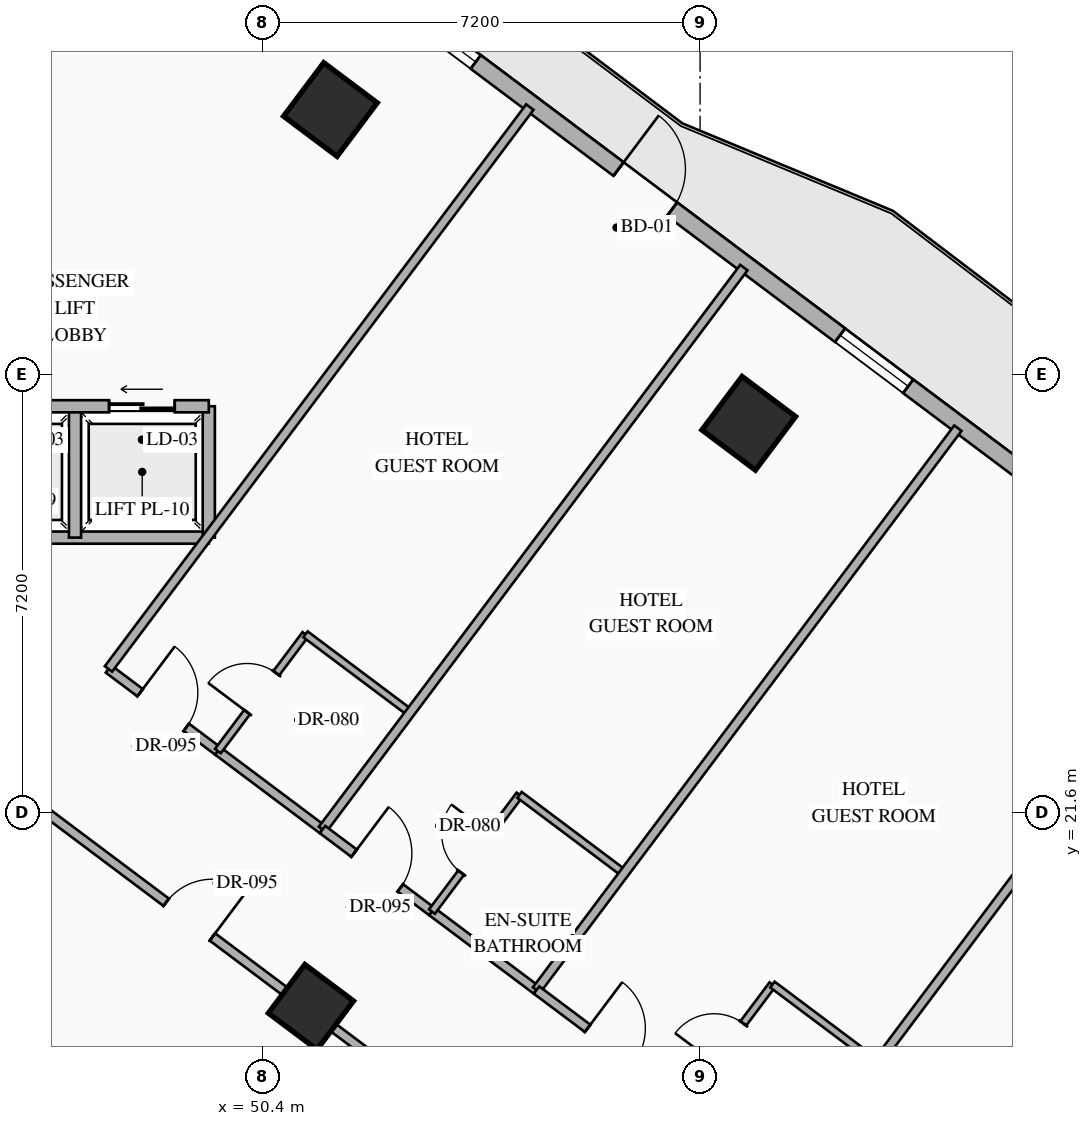
"""IFC4 building model, lengths in metres.
Left out: names, types, materials, properties, quantities, classifications, styles, units other than length and angle.
Written with IfcOpenShell. Run it as: python <this file> out.ifc"""

import sys

from ifc_helpers import new_model, si_unit, direction, frame, frame_2d, origin, origin_2d, place, context, subcontext, project, spatial, rectangle, hollow_rectangle, extrude, element, fill, save


model = new_model("IFC4")
c1 = context("Model", 3, precision=1e-05, world=origin(), true_north=direction((0.0, 1.0)))
c2 = subcontext(c1, "Body", "Model", "MODEL_VIEW")
j1 = project(units=[si_unit("LENGTHUNIT", "METRE"), si_unit("PLANEANGLEUNIT", "RADIAN")], contexts=[c1])
p1 = place(None, origin())
s1 = spatial("IfcSite", under=j1, at=p1, CompositionType="ELEMENT")
p2 = place(p1, origin())
s2 = spatial("IfcBuilding", under=s1, at=p2, CompositionType="ELEMENT")
p3 = place(p2, frame((0.0, 0.0, 46.65)))
s3 = spatial("IfcBuildingStorey", under=s2, at=p3, CompositionType="ELEMENT", Elevation=46.65)
for number, where, z_axis, x_axis in (
    (1, (51.52, 33.16, 0.0), (0.0, 0.0, 1.0), (0.8, -0.6, 0.0)),
    (2, (58.4, 28.0, 0.0), (0.0, 0.0, 1.0), (0.8, -0.6, 0.0)),
):
    element("IfcColumn", number, at=place(p3, frame(where, z_axis=z_axis, x_axis=x_axis)), inside=s3, PredefinedType="COLUMN", context=c2, shape_type="SweptSolid", body=[
        extrude(hollow_rectangle(XDim=1.1, YDim=1.1, WallThickness=0.04, at=origin_2d()), origin(), (0.0, 0.0, 1.0), 3.35),
    ])
p4 = place(p3, frame((51.2, 18.4, 0.0), z_axis=(0.0, 0.0, 1.0), x_axis=(0.799999996291, -0.600000004945, 0.0)))
e3 = element("IfcColumn", 3, at=p4, inside=s3, PredefinedType="COLUMN", context=c2, shape_type="SweptSolid", body=[
    extrude(hollow_rectangle(XDim=1.0, YDim=1.0, WallThickness=0.038, at=origin_2d()), origin(), (0.0, 0.0, 1.0), 3.35),
])
p5 = place(p3, frame((44.86, 40.73, 0.0), z_axis=(0.0, 0.0, 1.0), x_axis=(0.800006902154, -0.599990797017, 0.0)))
e4 = element("IfcWall", 4, at=p5, inside=s3, PredefinedType="STANDARD", context=c2, shape_type="SweptSolid", body=[
    extrude(rectangle(XDim=29.712, YDim=0.28, at=frame_2d((14.856, 0.0))), origin(), (0.0, 0.0, 1.0), 3.13),
])
p6 = place(p5, frame((14.249, 0.0, 0.0)))
e5 = element("IfcOpeningElement", 5, at=p6, cuts=e4, PredefinedType="OPENING", context=c2, shape_type="SweptSolid", body=[
    extrude(rectangle(XDim=1.1, YDim=2.2, at=frame_2d((0.55, 1.1))), frame((0.0, 0.15, 0.0), z_axis=(0.0, -1.0, 0.0), x_axis=(1.0, 0.0, 0.0)), (0.0, 0.0, 1.0), 0.3),
])
p7 = place(p5, frame((1.612, 0.0, 0.85)))
e6 = element("IfcOpeningElement", 6, at=p7, cuts=e4, PredefinedType="OPENING", context=c2, shape_type="SweptSolid", body=[
    extrude(rectangle(XDim=1.4, YDim=1.8, at=frame_2d((0.7, 0.9))), frame((0.0, 0.15, 0.0), z_axis=(0.0, -1.0, 0.0), x_axis=(1.0, 0.0, 0.0)), (0.0, 0.0, 1.0), 0.3),
])
p8 = place(p5, frame((5.667, 0.0, 0.85)))
e7 = element("IfcOpeningElement", 7, at=p8, cuts=e4, PredefinedType="OPENING", context=c2, shape_type="SweptSolid", body=[
    extrude(rectangle(XDim=1.4, YDim=1.8, at=frame_2d((0.7, 0.9))), frame((0.0, 0.15, 0.0), z_axis=(0.0, -1.0, 0.0), x_axis=(1.0, 0.0, 0.0)), (0.0, 0.0, 1.0), 0.3),
])
p9 = place(p5, frame((9.912, 0.0, 0.85)))
e8 = element("IfcOpeningElement", 8, at=p9, cuts=e4, PredefinedType="OPENING", context=c2, shape_type="SweptSolid", body=[
    extrude(rectangle(XDim=1.4, YDim=1.8, at=frame_2d((0.7, 0.9))), frame((0.0, 0.15, 0.0), z_axis=(0.0, -1.0, 0.0), x_axis=(1.0, 0.0, 0.0)), (0.0, 0.0, 1.0), 0.3),
])
p10 = place(p5, frame((18.803, 0.0, 0.85)))
e9 = element("IfcOpeningElement", 9, at=p10, cuts=e4, PredefinedType="OPENING", context=c2, shape_type="SweptSolid", body=[
    extrude(rectangle(XDim=1.4, YDim=1.8, at=frame_2d((0.7, 0.9))), frame((0.0, 0.15, 0.0), z_axis=(0.0, -1.0, 0.0), x_axis=(1.0, 0.0, 0.0)), (0.0, 0.0, 1.0), 0.3),
])
p11 = place(p5, frame((22.645, 0.0, 0.85)))
e10 = element("IfcOpeningElement", 10, at=p11, cuts=e4, PredefinedType="OPENING", context=c2, shape_type="SweptSolid", body=[
    extrude(rectangle(XDim=1.4, YDim=1.8, at=frame_2d((0.7, 0.9))), frame((0.0, 0.15, 0.0), z_axis=(0.0, -1.0, 0.0), x_axis=(1.0, 0.0, 0.0)), (0.0, 0.0, 1.0), 0.3),
])
p12 = place(p5, frame((27.668, 0.0, 0.85)))
e11 = element("IfcOpeningElement", 11, at=p12, cuts=e4, PredefinedType="OPENING", context=c2, shape_type="SweptSolid", body=[
    extrude(rectangle(XDim=1.4, YDim=1.8, at=frame_2d((0.7, 0.9))), frame((0.0, 0.15, 0.0), z_axis=(0.0, -1.0, 0.0), x_axis=(1.0, 0.0, 0.0)), (0.0, 0.0, 1.0), 0.3),
])
p13 = place(p3, frame((53.318, 2.487, 0.0), z_axis=(0.0, 0.0, 1.0), x_axis=(-0.800004174678, 0.599994433723, 0.0)))
e12 = element("IfcWall", 12, at=p13, inside=s3, PredefinedType="STANDARD", context=c2, shape_type="SweptSolid", body=[
    extrude(rectangle(XDim=35.089, YDim=0.28, at=frame_2d((17.544, 0.0))), origin(), (0.0, 0.0, 1.0), 3.13),
])
p14 = place(p13, frame((1.931, 0.0, 0.85)))
e13 = element("IfcOpeningElement", 13, at=p14, cuts=e12, PredefinedType="OPENING", context=c2, shape_type="SweptSolid", body=[
    extrude(rectangle(XDim=1.4, YDim=1.8, at=frame_2d((0.7, 0.9))), frame((0.0, 0.15, 0.0), z_axis=(0.0, -1.0, 0.0), x_axis=(1.0, 0.0, 0.0)), (0.0, 0.0, 1.0), 0.3),
])
p15 = place(p13, frame((6.819, 0.0, 0.85)))
e14 = element("IfcOpeningElement", 14, at=p15, cuts=e12, PredefinedType="OPENING", context=c2, shape_type="SweptSolid", body=[
    extrude(rectangle(XDim=1.4, YDim=1.8, at=frame_2d((0.7, 0.9))), frame((0.0, 0.15, 0.0), z_axis=(0.0, -1.0, 0.0), x_axis=(1.0, 0.0, 0.0)), (0.0, 0.0, 1.0), 0.3),
])
p16 = place(p13, frame((11.832, 0.0, 0.85)))
e15 = element("IfcOpeningElement", 15, at=p16, cuts=e12, PredefinedType="OPENING", context=c2, shape_type="SweptSolid", body=[
    extrude(rectangle(XDim=1.4, YDim=1.8, at=frame_2d((0.7, 0.9))), frame((0.0, 0.15, 0.0), z_axis=(0.0, -1.0, 0.0), x_axis=(1.0, 0.0, 0.0)), (0.0, 0.0, 1.0), 0.3),
])
p17 = place(p13, frame((17.647, 0.0, 0.85)))
e16 = element("IfcOpeningElement", 16, at=p17, cuts=e12, PredefinedType="OPENING", context=c2, shape_type="SweptSolid", body=[
    extrude(rectangle(XDim=1.4, YDim=1.8, at=frame_2d((0.7, 0.9))), frame((0.0, 0.15, 0.0), z_axis=(0.0, -1.0, 0.0), x_axis=(1.0, 0.0, 0.0)), (0.0, 0.0, 1.0), 0.3),
])
p18 = place(p13, frame((21.857, 0.0, 0.85)))
e17 = element("IfcOpeningElement", 17, at=p18, cuts=e12, PredefinedType="OPENING", context=c2, shape_type="SweptSolid", body=[
    extrude(rectangle(XDim=1.4, YDim=1.8, at=frame_2d((0.7, 0.9))), frame((0.0, 0.15, 0.0), z_axis=(0.0, -1.0, 0.0), x_axis=(1.0, 0.0, 0.0)), (0.0, 0.0, 1.0), 0.3),
])
p19 = place(p13, frame((26.87, 0.0, 0.85)))
e18 = element("IfcOpeningElement", 18, at=p19, cuts=e12, PredefinedType="OPENING", context=c2, shape_type="SweptSolid", body=[
    extrude(rectangle(XDim=1.4, YDim=1.8, at=frame_2d((0.7, 0.9))), frame((0.0, 0.15, 0.0), z_axis=(0.0, -1.0, 0.0), x_axis=(1.0, 0.0, 0.0)), (0.0, 0.0, 1.0), 0.3),
])
p20 = place(p13, frame((31.757, 0.0, 0.85)))
e19 = element("IfcOpeningElement", 19, at=p20, cuts=e12, PredefinedType="OPENING", context=c2, shape_type="SweptSolid", body=[
    extrude(rectangle(XDim=1.4, YDim=1.8, at=frame_2d((0.7, 0.9))), frame((0.0, 0.15, 0.0), z_axis=(0.0, -1.0, 0.0), x_axis=(1.0, 0.0, 0.0)), (0.0, 0.0, 1.0), 0.3),
])
p21 = place(p3, frame((45.12, 26.12, 0.0), z_axis=(0.0, 0.0, 1.0), x_axis=(1.0, 0.0, 0.0)))
e20 = element("IfcWall", 20, at=p21, inside=s3, PredefinedType="STANDARD", context=c2, shape_type="SweptSolid", body=[
    extrude(rectangle(XDim=4.4, YDim=0.2, at=frame_2d((2.2, 0.0))), origin(), (0.0, 0.0, 1.0), 3.13),
])
for number, where, z_axis, x_axis in (
    (21, (49.52, 26.12, 0.0), (0.0, 0.0, 1.0), (0.0, 1.0, 0.0)),
    (22, (47.32, 26.12, 0.0), (0.0, 0.0, 1.0), (0.0, 1.0, 0.0)),
):
    element("IfcWall", number, at=place(p3, frame(where, z_axis=z_axis, x_axis=x_axis)), inside=s3, PredefinedType="STANDARD", context=c2, shape_type="SweptSolid", body=[
        extrude(rectangle(XDim=2.16, YDim=0.2, at=frame_2d((1.08, 0.0))), origin(), (0.0, 0.0, 1.0), 3.13),
    ])
p22 = place(p3, frame((45.12, 28.28, 0.0), z_axis=(0.0, 0.0, 1.0), x_axis=(1.0, 0.0, 0.0)))
e23 = element("IfcWall", 23, at=p22, inside=s3, PredefinedType="STANDARD", context=c2, shape_type="SweptSolid", body=[
    extrude(rectangle(XDim=4.4, YDim=0.2, at=frame_2d((2.2, 0.0))), origin(), (0.0, 0.0, 1.0), 3.13),
])
p23 = place(p22, frame((0.56, 0.0, 0.0)))
e24 = element("IfcOpeningElement", 24, at=p23, cuts=e23, PredefinedType="OPENING", context=c2, shape_type="SweptSolid", body=[
    extrude(rectangle(XDim=1.08, YDim=2.15, at=frame_2d((0.54, 1.075))), frame((0.0, 0.11, 0.0), z_axis=(0.0, -1.0, 0.0), x_axis=(1.0, 0.0, 0.0)), (0.0, 0.0, 1.0), 0.22),
])
p24 = place(p22, frame((2.76, 0.0, 0.0)))
e25 = element("IfcOpeningElement", 25, at=p24, cuts=e23, PredefinedType="OPENING", context=c2, shape_type="SweptSolid", body=[
    extrude(rectangle(XDim=1.08, YDim=2.15, at=frame_2d((0.54, 1.075))), frame((0.0, 0.11, 0.0), z_axis=(0.0, -1.0, 0.0), x_axis=(1.0, 0.0, 0.0)), (0.0, 0.0, 1.0), 0.22),
])
p25 = place(p3, frame((47.87, 23.96, 0.0), z_axis=(0.0, 0.0, 1.0), x_axis=(0.8, -0.6, 0.0)))
e26 = element("IfcWall", 26, at=p25, inside=s3, PredefinedType="PARTITIONING", context=c2, shape_type="SweptSolid", body=[
    extrude(rectangle(XDim=2.25, YDim=0.15, at=frame_2d((1.125, 0.0))), origin(), (0.0, 0.0, 1.0), 2.775),
])
p26 = place(p25, frame((0.65, 0.0, 0.0)))
e27 = element("IfcOpeningElement", 27, at=p26, cuts=e26, PredefinedType="OPENING", context=c2, shape_type="SweptSolid", body=[
    extrude(rectangle(XDim=0.95, YDim=2.15, at=frame_2d((0.475, 1.075))), frame((0.0, 0.085, 0.0), z_axis=(0.0, -1.0, 0.0), x_axis=(1.0, 0.0, 0.0)), (0.0, 0.0, 1.0), 0.17),
])
p27 = place(p3, frame((49.67, 22.61, 0.0), z_axis=(0.0, 0.0, 1.0), x_axis=(0.79998637334, -0.60001816845, 0.0)))
e28 = element("IfcWall", 28, at=p27, inside=s3, PredefinedType="PARTITIONING", context=c2, shape_type="SweptSolid", body=[
    extrude(rectangle(XDim=2.15, YDim=0.15, at=frame_2d((1.075, 0.0))), origin(), (0.0, 0.0, 1.0), 2.775),
])
p28 = place(p3, frame((49.67, 22.61, 0.0), z_axis=(0.0, 0.0, 1.0), x_axis=(0.600065100855, 0.79995117022, 0.0)))
e29 = element("IfcWall", 29, at=p28, inside=s3, PredefinedType="PARTITIONING", context=c2, shape_type="SweptSolid", body=[
    extrude(rectangle(XDim=2.4, YDim=0.12, at=frame_2d((1.2, 0.0))), origin(), (0.0, 0.0, 1.0), 3.13),
])
p29 = place(p28, frame((0.8, 0.0, 0.0)))
e30 = element("IfcOpeningElement", 30, at=p29, cuts=e29, PredefinedType="OPENING", context=c2, shape_type="SweptSolid", body=[
    extrude(rectangle(XDim=0.8, YDim=2.06, at=frame_2d((0.4, 1.03))), frame((0.0, 0.07, 0.0), z_axis=(0.0, -1.0, 0.0), x_axis=(1.0, 0.0, 0.0)), (0.0, 0.0, 1.0), 0.14),
])
p30 = place(p3, frame((51.11, 24.53, 0.0), z_axis=(0.0, 0.0, 1.0), x_axis=(0.79998637334, -0.60001816845, 0.0)))
e31 = element("IfcWall", 31, at=p30, inside=s3, PredefinedType="PARTITIONING", context=c2, shape_type="SweptSolid", body=[
    extrude(rectangle(XDim=2.15, YDim=0.12, at=frame_2d((1.075, 0.0))), origin(), (0.0, 0.0, 1.0), 3.13),
])
for number, where, z_axis, x_axis in (
    (32, (47.87, 23.96, 0.0), (0.0, 0.0, 1.0), (0.6, 0.8, 0.0)),
    (33, (51.39, 21.32, 0.0), (0.0, 0.0, 1.0), (0.6, 0.8, 0.0)),
):
    element("IfcWall", number, at=place(p3, frame(where, z_axis=z_axis, x_axis=x_axis)), inside=s3, PredefinedType="PARTITIONING", context=c2, shape_type="SweptSolid", body=[
        extrude(rectangle(XDim=11.55, YDim=0.15, at=frame_2d((5.775, 0.0))), origin(), (0.0, 0.0, 1.0), 3.13),
    ])
p31 = place(p3, frame((51.39, 21.32, 0.0), z_axis=(0.0, 0.0, 1.0), x_axis=(0.799986979543, -0.600017360216, 0.0)))
e34 = element("IfcWall", 34, at=p31, inside=s3, PredefinedType="PARTITIONING", context=c2, shape_type="SweptSolid", body=[
    extrude(rectangle(XDim=2.25, YDim=0.15, at=frame_2d((1.125, 0.0))), origin(), (0.0, 0.0, 1.0), 2.775),
])
p32 = place(p31, frame((0.65, 0.0, 0.0)))
e35 = element("IfcOpeningElement", 35, at=p32, cuts=e34, PredefinedType="OPENING", context=c2, shape_type="SweptSolid", body=[
    extrude(rectangle(XDim=0.95, YDim=2.15, at=frame_2d((0.475, 1.075))), frame((0.0, 0.085, 0.0), z_axis=(0.0, -1.0, 0.0), x_axis=(1.0, 0.0, 0.0)), (0.0, 0.0, 1.0), 0.17),
])
p33 = place(p3, frame((53.19, 19.97, 0.0), z_axis=(0.0, 0.0, 1.0), x_axis=(0.79998637334, -0.60001816845, 0.0)))
e36 = element("IfcWall", 36, at=p33, inside=s3, PredefinedType="PARTITIONING", context=c2, shape_type="SweptSolid", body=[
    extrude(rectangle(XDim=2.15, YDim=0.15, at=frame_2d((1.075, 0.0))), origin(), (0.0, 0.0, 1.0), 2.775),
])
p34 = place(p3, frame((53.19, 19.97, 0.0), z_axis=(0.0, 0.0, 1.0), x_axis=(0.6, 0.8, 0.0)))
e37 = element("IfcWall", 37, at=p34, inside=s3, PredefinedType="PARTITIONING", context=c2, shape_type="SweptSolid", body=[
    extrude(rectangle(XDim=2.4, YDim=0.12, at=frame_2d((1.2, 0.0))), origin(), (0.0, 0.0, 1.0), 3.13),
])
p35 = place(p34, frame((0.8, 0.0, 0.0)))
e38 = element("IfcOpeningElement", 38, at=p35, cuts=e37, PredefinedType="OPENING", context=c2, shape_type="SweptSolid", body=[
    extrude(rectangle(XDim=0.8, YDim=2.06, at=frame_2d((0.4, 1.03))), frame((0.0, 0.07, 0.0), z_axis=(0.0, -1.0, 0.0), x_axis=(1.0, 0.0, 0.0)), (0.0, 0.0, 1.0), 0.14),
])
p36 = place(p3, frame((54.63, 21.89, 0.0), z_axis=(0.0, 0.0, 1.0), x_axis=(0.800081749437, -0.599890985279, 0.0)))
e39 = element("IfcWall", 39, at=p36, inside=s3, PredefinedType="PARTITIONING", context=c2, shape_type="SweptSolid", body=[
    extrude(rectangle(XDim=2.15, YDim=0.12, at=frame_2d((1.075, 0.0))), origin(), (0.0, 0.0, 1.0), 3.13),
])
p37 = place(p3, frame((54.91, 18.68, 0.0), z_axis=(0.0, 0.0, 1.0), x_axis=(0.60001014597, 0.799992390422, 0.0)))
e40 = element("IfcWall", 40, at=p37, inside=s3, PredefinedType="PARTITIONING", context=c2, shape_type="SweptSolid", body=[
    extrude(rectangle(XDim=11.55, YDim=0.15, at=frame_2d((5.775, 0.0))), origin(), (0.0, 0.0, 1.0), 3.13),
])
p38 = place(p3, frame((54.91, 18.68, 0.0), z_axis=(0.0, 0.0, 1.0), x_axis=(0.800048024332, -0.599935962218, 0.0)))
e41 = element("IfcWall", 41, at=p38, inside=s3, PredefinedType="PARTITIONING", context=c2, shape_type="SweptSolid", body=[
    extrude(rectangle(XDim=3.05, YDim=0.15, at=frame_2d((1.525, 0.0))), origin(), (0.0, 0.0, 1.0), 2.775),
])
p39 = place(p38, frame((1.05, 0.0, 0.0)))
e42 = element("IfcOpeningElement", 42, at=p39, cuts=e41, PredefinedType="OPENING", context=c2, shape_type="SweptSolid", body=[
    extrude(rectangle(XDim=0.95, YDim=2.15, at=frame_2d((0.475, 1.075))), frame((0.0, 0.085, 0.0), z_axis=(0.0, -1.0, 0.0), x_axis=(1.0, 0.0, 0.0)), (0.0, 0.0, 1.0), 0.17),
])
p40 = place(p3, frame((57.35, 16.85, 0.0), z_axis=(0.0, 0.0, 1.0), x_axis=(0.6, 0.8, 0.0)))
e43 = element("IfcWall", 43, at=p40, inside=s3, PredefinedType="PARTITIONING", context=c2, shape_type="SweptSolid", body=[
    extrude(rectangle(XDim=2.4, YDim=0.12, at=frame_2d((1.2, 0.0))), origin(), (0.0, 0.0, 1.0), 3.13),
])
p41 = place(p40, frame((0.8, 0.0, 0.0)))
e44 = element("IfcOpeningElement", 44, at=p41, cuts=e43, PredefinedType="OPENING", context=c2, shape_type="SweptSolid", body=[
    extrude(rectangle(XDim=0.8, YDim=2.06, at=frame_2d((0.4, 1.03))), frame((0.0, 0.07, 0.0), z_axis=(0.0, -1.0, 0.0), x_axis=(1.0, 0.0, 0.0)), (0.0, 0.0, 1.0), 0.14),
])
p42 = place(p3, frame((58.79, 18.77, 0.0), z_axis=(0.0, 0.0, 1.0), x_axis=(0.79998637334, -0.60001816845, 0.0)))
e45 = element("IfcWall", 45, at=p42, inside=s3, PredefinedType="PARTITIONING", context=c2, shape_type="SweptSolid", body=[
    extrude(rectangle(XDim=2.15, YDim=0.12, at=frame_2d((1.075, 0.0))), origin(), (0.0, 0.0, 1.0), 3.13),
])
p43 = place(p3, frame((59.07, 15.56, 0.0), z_axis=(0.0, 0.0, 1.0), x_axis=(0.599996617946, 0.80000253653, 0.0)))
e46 = element("IfcWall", 46, at=p43, inside=s3, PredefinedType="PARTITIONING", context=c2, shape_type="SweptSolid", body=[
    extrude(rectangle(XDim=11.55, YDim=0.15, at=frame_2d((5.775, 0.0))), origin(), (0.0, 0.0, 1.0), 3.13),
])
p44 = place(p3, frame((46.37, 21.96, 0.0), z_axis=(0.0, 0.0, 1.0), x_axis=(0.799997249048, -0.600003667918, 0.0)))
e47 = element("IfcWall", 47, at=p44, inside=s3, PredefinedType="PARTITIONING", context=c2, shape_type="SweptSolid", body=[
    extrude(rectangle(XDim=10.65, YDim=0.15, at=frame_2d((5.325, 0.0))), origin(), (0.0, 0.0, 1.0), 2.425),
])
p45 = place(p44, frame((3.062, 0.0, 0.0)))
e48 = element("IfcOpeningElement", 48, at=p45, cuts=e47, PredefinedType="OPENING", context=c2, shape_type="SweptSolid", body=[
    extrude(rectangle(XDim=0.95, YDim=2.15, at=frame_2d((0.475, 1.075))), frame((0.0, 0.085, 0.0), z_axis=(0.0, -1.0, 0.0), x_axis=(1.0, 0.0, 0.0)), (0.0, 0.0, 1.0), 0.17),
])
p46 = place(p6, origin())
e49 = element("IfcDoor", 49, at=p46, inside=s3, OperationType="SINGLE_SWING_LEFT", PredefinedType="DOOR", context=c2, shape_type="SweptSolid", body=[
    extrude(rectangle(XDim=1.1, YDim=2.2, at=frame_2d((0.55, 1.1))), frame((0.0, 0.025, 0.0), z_axis=(0.0, -1.0, 0.0), x_axis=(1.0, 0.0, 0.0)), (0.0, 0.0, 1.0), 0.05),
])
fill(e5, e49)
p47 = place(p9, origin())
e50 = element("IfcWindow", 50, at=p47, inside=s3, PartitioningType="SINGLE_PANEL", PredefinedType="WINDOW", context=c2, shape_type="SweptSolid", body=[
    extrude(rectangle(XDim=1.4, YDim=1.8, at=frame_2d((0.7, 0.9))), frame((0.0, 0.03, 0.0), z_axis=(0.0, -1.0, 0.0), x_axis=(1.0, 0.0, 0.0)), (0.0, 0.0, 1.0), 0.06),
])
fill(e8, e50)
p48 = place(p10, origin())
e51 = element("IfcWindow", 51, at=p48, inside=s3, PartitioningType="SINGLE_PANEL", PredefinedType="WINDOW", context=c2, shape_type="SweptSolid", body=[
    extrude(rectangle(XDim=1.4, YDim=1.8, at=frame_2d((0.7, 0.9))), frame((0.0, 0.03, 0.0), z_axis=(0.0, -1.0, 0.0), x_axis=(1.0, 0.0, 0.0)), (0.0, 0.0, 1.0), 0.06),
])
fill(e9, e51)
p49 = place(p24, origin())
e52 = element("IfcDoor", 52, at=p49, inside=s3, OperationType="SLIDING_TO_LEFT", PredefinedType="USERDEFINED", context=c2, shape_type="SweptSolid", body=[
    extrude(rectangle(XDim=1.08, YDim=2.15, at=frame_2d((0.54, 1.075))), frame((0.0, 0.025, 0.0), z_axis=(0.0, -1.0, 0.0), x_axis=(1.0, 0.0, 0.0)), (0.0, 0.0, 1.0), 0.05),
])
fill(e25, e52)
p50 = place(p26, origin())
e53 = element("IfcDoor", 53, at=p50, inside=s3, OperationType="SINGLE_SWING_LEFT", PredefinedType="DOOR", context=c2, shape_type="SweptSolid", body=[
    extrude(rectangle(XDim=0.95, YDim=2.15, at=frame_2d((0.475, 1.075))), frame((0.0, 0.025, 0.0), z_axis=(0.0, -1.0, 0.0), x_axis=(1.0, 0.0, 0.0)), (0.0, 0.0, 1.0), 0.05),
])
fill(e27, e53)
p51 = place(p29, origin())
e54 = element("IfcDoor", 54, at=p51, inside=s3, OperationType="SINGLE_SWING_LEFT", PredefinedType="DOOR", context=c2, shape_type="SweptSolid", body=[
    extrude(rectangle(XDim=0.8, YDim=2.06, at=frame_2d((0.4, 1.03))), frame((0.0, 0.025, 0.0), z_axis=(0.0, -1.0, 0.0), x_axis=(1.0, 0.0, 0.0)), (0.0, 0.0, 1.0), 0.05),
])
fill(e30, e54)
p52 = place(p32, origin())
e55 = element("IfcDoor", 55, at=p52, inside=s3, OperationType="SINGLE_SWING_LEFT", PredefinedType="DOOR", context=c2, shape_type="SweptSolid", body=[
    extrude(rectangle(XDim=0.95, YDim=2.15, at=frame_2d((0.475, 1.075))), frame((0.0, 0.025, 0.0), z_axis=(0.0, -1.0, 0.0), x_axis=(1.0, 0.0, 0.0)), (0.0, 0.0, 1.0), 0.05),
])
fill(e35, e55)
p53 = place(p35, origin())
e56 = element("IfcDoor", 56, at=p53, inside=s3, OperationType="SINGLE_SWING_RIGHT", PredefinedType="DOOR", context=c2, shape_type="SweptSolid", body=[
    extrude(rectangle(XDim=0.8, YDim=2.06, at=frame_2d((0.4, 1.03))), frame((0.0, 0.025, 0.0), z_axis=(0.0, -1.0, 0.0), x_axis=(1.0, 0.0, 0.0)), (0.0, 0.0, 1.0), 0.05),
])
fill(e38, e56)
p54 = place(p39, origin())
e57 = element("IfcDoor", 57, at=p54, inside=s3, OperationType="SINGLE_SWING_LEFT", PredefinedType="DOOR", context=c2, shape_type="SweptSolid", body=[
    extrude(rectangle(XDim=0.95, YDim=2.15, at=frame_2d((0.475, 1.075))), frame((0.0, 0.025, 0.0), z_axis=(0.0, -1.0, 0.0), x_axis=(1.0, 0.0, 0.0)), (0.0, 0.0, 1.0), 0.05),
])
fill(e42, e57)
p55 = place(p41, origin())
e58 = element("IfcDoor", 58, at=p55, inside=s3, OperationType="SINGLE_SWING_LEFT", PredefinedType="DOOR", context=c2, shape_type="SweptSolid", body=[
    extrude(rectangle(XDim=0.8, YDim=2.06, at=frame_2d((0.4, 1.03))), frame((0.0, 0.025, 0.0), z_axis=(0.0, -1.0, 0.0), x_axis=(1.0, 0.0, 0.0)), (0.0, 0.0, 1.0), 0.05),
])
fill(e44, e58)
p56 = place(p45, origin())
e59 = element("IfcDoor", 59, at=p56, inside=s3, OperationType="SINGLE_SWING_RIGHT", PredefinedType="DOOR", context=c2, shape_type="SweptSolid", body=[
    extrude(rectangle(XDim=0.95, YDim=2.15, at=frame_2d((0.475, 1.075))), frame((0.0, 0.025, 0.0), z_axis=(0.0, -1.0, 0.0), x_axis=(1.0, 0.0, 0.0)), (0.0, 0.0, 1.0), 0.05),
])
fill(e48, e59)
save(model, sys.argv[1])
